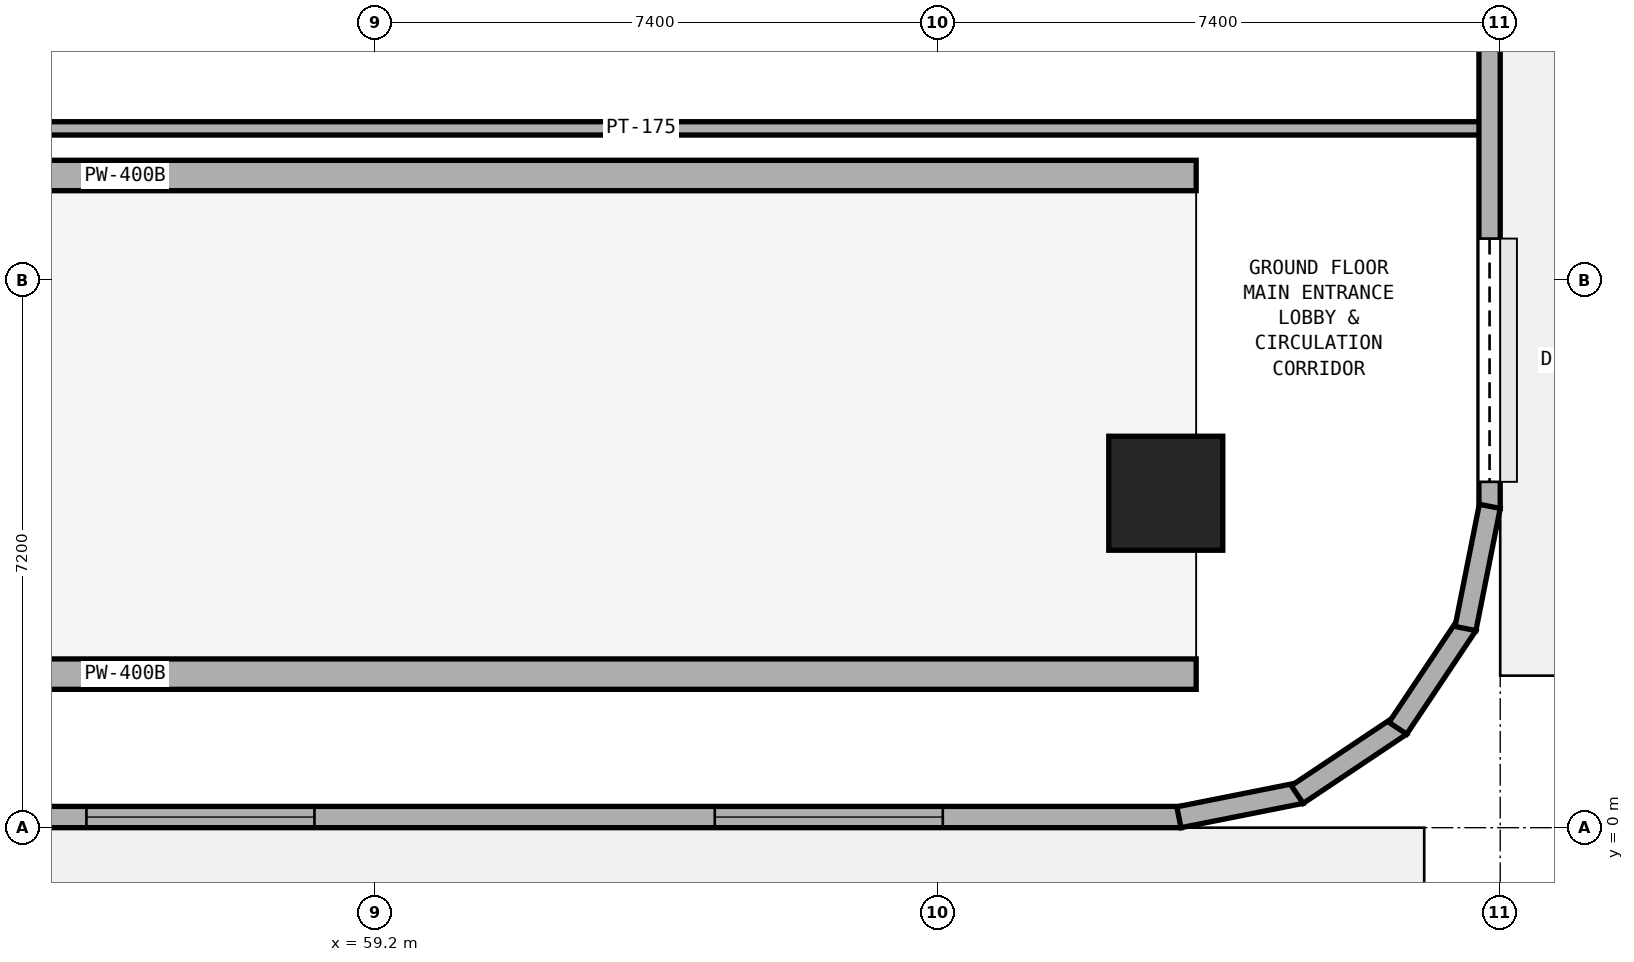
"""IFC4 building model, lengths in metres.
Left out: names, types, materials, properties, quantities, classifications, styles, units other than length and angle.
Written with IfcOpenShell. Run it as: python <this file> out.ifc"""

import sys

from ifc_helpers import new_model, si_unit, direction, frame, frame_2d, origin, origin_2d, place, context, subcontext, project, spatial, rectangle, extrude, element, fill, save


model = new_model("IFC4")
c1 = context("Model", 3, precision=1e-05, world=origin(), true_north=direction((0.0, 1.0)))
c2 = subcontext(c1, "Body", "Model", "MODEL_VIEW")
j1 = project(units=[si_unit("LENGTHUNIT", "METRE"), si_unit("PLANEANGLEUNIT", "RADIAN")], contexts=[c1])
p1 = place(None, origin())
s1 = spatial("IfcSite", under=j1, at=p1, CompositionType="ELEMENT")
p2 = place(p1, origin())
s2 = spatial("IfcBuilding", under=s1, at=p2, CompositionType="ELEMENT")
p3 = place(p2, origin())
s3 = spatial("IfcBuildingStorey", under=s2, at=p3, CompositionType="ELEMENT", Elevation=0.0)
p4 = place(p3, frame((69.6, 4.4, 0.0), z_axis=(0.0, 0.0, 1.0), x_axis=(1.0, 0.0, 0.0)))
e1 = element("IfcColumn", 1, at=p4, inside=s3, PredefinedType="COLUMN", context=c2, shape_type="SweptSolid", body=[
    extrude(rectangle(XDim=1.5, YDim=1.5, at=origin_2d()), origin(), (0.0, 0.0, 1.0), 5.0),
])
for number, where, z_axis, x_axis in (
    (2, (41.82, 2.02, 0.0), (0.0, 0.0, 1.0), (1.0, 0.0, 0.0)),
    (3, (41.82, 8.58, 0.0), (0.0, 0.0, 1.0), (1.0, 0.0, 0.0)),
):
    element("IfcWall", number, at=place(p3, frame(where, z_axis=z_axis, x_axis=x_axis)), inside=s3, PredefinedType="SOLIDWALL", context=c2, shape_type="SweptSolid", body=[
        extrude(rectangle(XDim=28.18, YDim=0.4, at=frame_2d((14.09, 0.0))), origin(), (0.0, 0.0, 1.0), 1.18),
    ])
p5 = place(p3, frame((51.6, 9.2, 0.0), z_axis=(0.0, 0.0, 1.0), x_axis=(1.0, 0.0, 0.0)))
e4 = element("IfcWall", 4, at=p5, inside=s3, PredefinedType="PARTITIONING", context=c2, shape_type="SweptSolid", body=[
    extrude(rectangle(XDim=22.195, YDim=0.175, at=frame_2d((11.097, 0.0))), origin(), (0.0, 0.0, 1.0), 4.66),
])
p6 = place(p3, frame((73.86, 46.2, 0.0), z_axis=(0.0, 0.0, 1.0), x_axis=(0.0, -1.0, 0.0)))
e5 = element("IfcWall", 5, at=p6, inside=s3, PredefinedType="STANDARD", context=c2, shape_type="SweptSolid", body=[
    extrude(rectangle(XDim=42.0, YDim=0.28, at=frame_2d((21.0, 0.0))), origin(), (0.0, 0.0, 1.0), 3.76),
])
p7 = place(p6, frame((7.0, 0.0, 0.0)))
e6 = element("IfcOpeningElement", 6, at=p7, cuts=e5, PredefinedType="OPENING", context=c2, shape_type="SweptSolid", body=[
    extrude(rectangle(XDim=1.1, YDim=2.15, at=frame_2d((0.55, 1.075))), frame((0.0, 0.15, 0.0), z_axis=(0.0, -1.0, 0.0), x_axis=(1.0, 0.0, 0.0)), (0.0, 0.0, 1.0), 0.3),
])
p8 = place(p6, frame((13.2, 0.0, 0.0)))
e7 = element("IfcOpeningElement", 7, at=p8, cuts=e5, PredefinedType="OPENING", context=c2, shape_type="SweptSolid", body=[
    extrude(rectangle(XDim=3.2, YDim=3.4, at=frame_2d((1.6, 1.7))), frame((0.0, 0.15, 0.0), z_axis=(0.0, -1.0, 0.0), x_axis=(1.0, 0.0, 0.0)), (0.0, 0.0, 1.0), 0.3),
])
p9 = place(p6, frame((38.45, 0.0, 0.0)))
e8 = element("IfcOpeningElement", 8, at=p9, cuts=e5, PredefinedType="OPENING", context=c2, shape_type="SweptSolid", body=[
    extrude(rectangle(XDim=3.2, YDim=3.4, at=frame_2d((1.6, 1.7))), frame((0.0, 0.15, 0.0), z_axis=(0.0, -1.0, 0.0), x_axis=(1.0, 0.0, 0.0)), (0.0, 0.0, 1.0), 0.3),
])
p10 = place(p3, frame((44.0, 0.14, 0.0), z_axis=(0.0, 0.0, 1.0), x_axis=(1.0, 0.0, 0.0)))
e9 = element("IfcWall", 9, at=p10, inside=s3, PredefinedType="STANDARD", context=c2, shape_type="SweptSolid", body=[
    extrude(rectangle(XDim=25.8, YDim=0.28, at=frame_2d((12.9, 0.0))), origin(), (0.0, 0.0, 1.0), 4.66),
])
p11 = place(p10, frame((3.133, 0.0, 0.9)))
e10 = element("IfcOpeningElement", 10, at=p11, cuts=e9, PredefinedType="OPENING", context=c2, shape_type="SweptSolid", body=[
    extrude(rectangle(XDim=3.0, YDim=2.2, at=frame_2d((1.5, 1.1))), frame((0.0, 0.15, 0.0), z_axis=(0.0, -1.0, 0.0), x_axis=(1.0, 0.0, 0.0)), (0.0, 0.0, 1.0), 0.3),
])
p12 = place(p10, frame((11.4, 0.0, 0.9)))
e11 = element("IfcOpeningElement", 11, at=p12, cuts=e9, PredefinedType="OPENING", context=c2, shape_type="SweptSolid", body=[
    extrude(rectangle(XDim=3.0, YDim=2.2, at=frame_2d((1.5, 1.1))), frame((0.0, 0.15, 0.0), z_axis=(0.0, -1.0, 0.0), x_axis=(1.0, 0.0, 0.0)), (0.0, 0.0, 1.0), 0.3),
])
p13 = place(p10, frame((19.667, 0.0, 0.9)))
e12 = element("IfcOpeningElement", 12, at=p13, cuts=e9, PredefinedType="OPENING", context=c2, shape_type="SweptSolid", body=[
    extrude(rectangle(XDim=3.0, YDim=2.2, at=frame_2d((1.5, 1.1))), frame((0.0, 0.15, 0.0), z_axis=(0.0, -1.0, 0.0), x_axis=(1.0, 0.0, 0.0)), (0.0, 0.0, 1.0), 0.3),
])
for number, where, z_axis, x_axis in (
    (13, (69.773, 0.137, 0.0), (0.0, 0.0, 1.0), (0.981, 0.195, 0.0)),
    (14, (71.33, 0.436, 0.0), (0.0, 0.0, 1.0), (0.831, 0.556, 0.0)),
    (15, (72.653, 1.308, 0.0), (0.0, 0.0, 1.0), (0.556, 0.831, 0.0)),
    (16, (73.543, 2.62, 0.0), (0.0, 0.0, 1.0), (0.195, 0.981, 0.0)),
):
    element("IfcWall", number, at=place(p3, frame(where, z_axis=z_axis, x_axis=x_axis)), inside=s3, PredefinedType="STANDARD", context=c2, shape_type="SweptSolid", body=[
        extrude(rectangle(XDim=1.639, YDim=0.28, at=frame_2d((0.819, 0.0))), origin(), (0.0, 0.0, 1.0), 4.66),
    ])
p14 = place(p9, origin())
e17 = element("IfcDoor", 17, at=p14, inside=s3, OperationType="ROLLINGUP", PredefinedType="DOOR", context=c2, shape_type="SweptSolid", body=[
    extrude(rectangle(XDim=3.2, YDim=3.4, at=frame_2d((1.6, 1.7))), frame((0.0, 0.025, 0.0), z_axis=(0.0, -1.0, 0.0), x_axis=(1.0, 0.0, 0.0)), (0.0, 0.0, 1.0), 0.05),
])
fill(e8, e17)
p15 = place(p12, origin())
e18 = element("IfcWindow", 18, at=p15, inside=s3, PartitioningType="SINGLE_PANEL", PredefinedType="WINDOW", context=c2, shape_type="SweptSolid", body=[
    extrude(rectangle(XDim=3.0, YDim=2.2, at=frame_2d((1.5, 1.1))), frame((0.0, 0.03, 0.0), z_axis=(0.0, -1.0, 0.0), x_axis=(1.0, 0.0, 0.0)), (0.0, 0.0, 1.0), 0.06),
])
fill(e11, e18)
p16 = place(p13, origin())
e19 = element("IfcWindow", 19, at=p16, inside=s3, PartitioningType="SINGLE_PANEL", PredefinedType="WINDOW", context=c2, shape_type="SweptSolid", body=[
    extrude(rectangle(XDim=3.0, YDim=2.2, at=frame_2d((1.5, 1.1))), frame((0.0, 0.03, 0.0), z_axis=(0.0, -1.0, 0.0), x_axis=(1.0, 0.0, 0.0)), (0.0, 0.0, 1.0), 0.06),
])
fill(e12, e19)
save(model, sys.argv[1])
